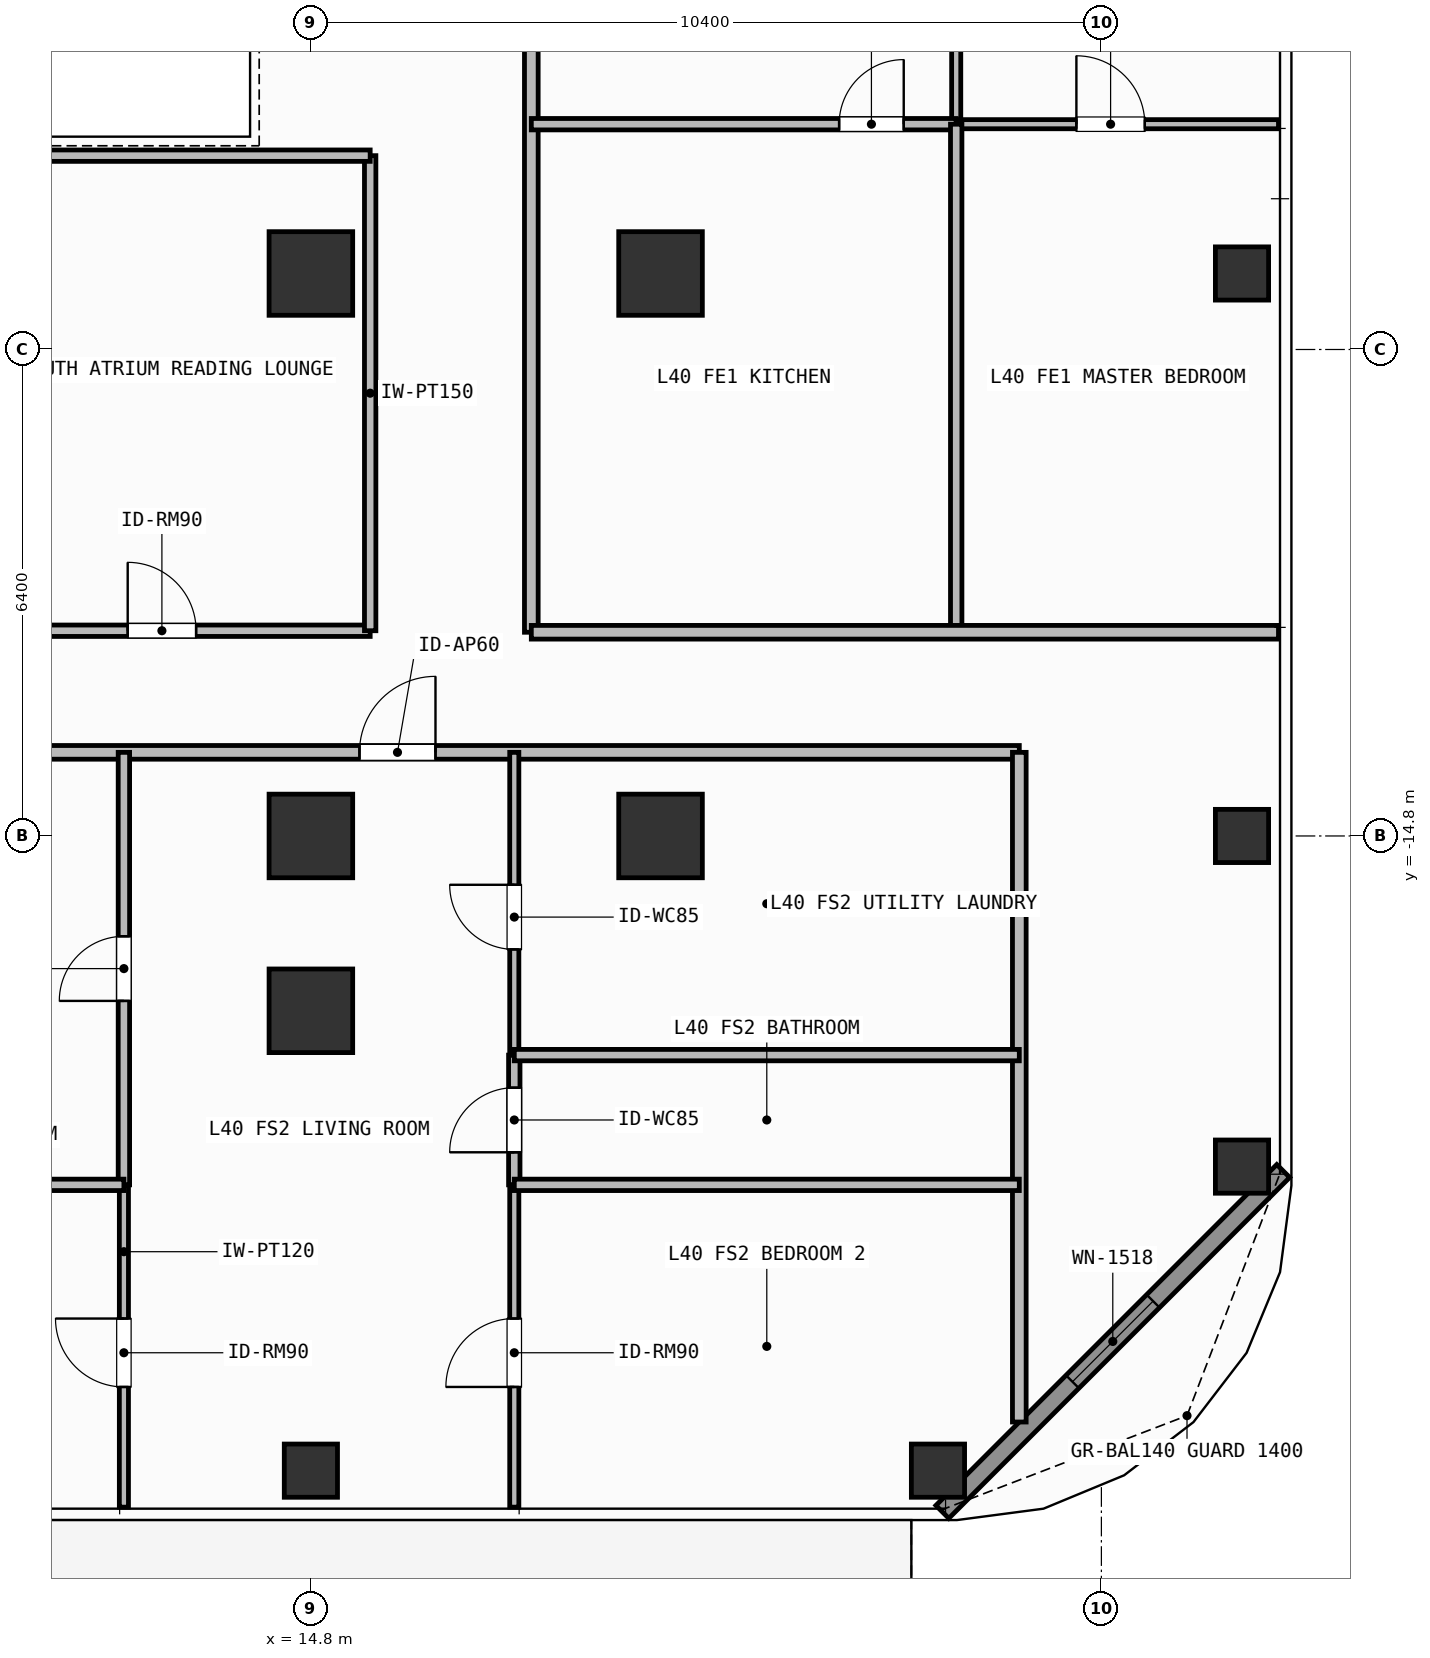
"""IFC4 building model, lengths in metres.
Left out: names, types, materials, properties, quantities, classifications, styles, units other than length and angle.
Written with IfcOpenShell. Run it as: python <this file> out.ifc"""

import sys

from ifc_helpers import new_model, si_unit, direction, frame, frame_2d, origin, origin_2d, place, context, subcontext, project, spatial, rectangle, hollow_rectangle, extrude, element, fill, save


model = new_model("IFC4")
c1 = context("Model", 3, precision=1e-05, world=origin(), true_north=direction((0.0, 1.0)))
c2 = subcontext(c1, "Body", "Model", "MODEL_VIEW")
j1 = project(units=[si_unit("LENGTHUNIT", "METRE"), si_unit("PLANEANGLEUNIT", "RADIAN")], contexts=[c1])
p1 = place(None, origin())
s1 = spatial("IfcSite", under=j1, at=p1, CompositionType="ELEMENT")
p2 = place(p1, origin())
s2 = spatial("IfcBuilding", under=s1, at=p2, CompositionType="ELEMENT")
p3 = place(p2, frame((0.0, 0.0, 164.1)))
s3 = spatial("IfcBuildingStorey", under=s2, at=p3, CompositionType="ELEMENT", Elevation=164.1)
for number, where, z_axis, x_axis in (
    (1, (14.8, -14.8, 0.0), (0.0, 0.0, 1.0), (1.0, 0.0, 0.0)),
    (2, (14.8, -7.4, 0.0), (0.0, 0.0, 1.0), (1.0, 0.0, 0.0)),
    (3, (19.4, -14.8, 0.0), (0.0, 0.0, 1.0), (1.0, 0.0, 0.0)),
    (4, (19.4, -7.4, 0.0), (0.0, 0.0, 1.0), (1.0, 0.0, 0.0)),
    (5, (14.8, -17.1, 0.0), (0.0, 0.0, 1.0), (1.0, 0.0, 0.0)),
):
    element("IfcColumn", number, at=place(p3, frame(where, z_axis=z_axis, x_axis=x_axis)), inside=s3, PredefinedType="COLUMN", context=c2, shape_type="SweptSolid", body=[
        extrude(rectangle(XDim=1.1, YDim=1.1, at=origin_2d()), origin(), (0.0, 0.0, 1.0), 3.9),
    ])
for number, where, z_axis, x_axis in (
    (6, (23.05, -23.15, 0.0), (0.0, 0.0, 1.0), (1.0, 0.0, 0.0)),
    (7, (27.05, -19.15, 0.0), (0.0, 0.0, 1.0), (1.0, 0.0, 0.0)),
    (8, (14.8, -23.15, 0.0), (0.0, 0.0, 1.0), (1.0, 0.0, 0.0)),
    (9, (27.05, -14.8, 0.0), (0.0, 0.0, 1.0), (1.0, 0.0, 0.0)),
    (10, (27.05, -7.4, 0.0), (0.0, 0.0, 1.0), (1.0, 0.0, 0.0)),
):
    element("IfcColumn", number, at=place(p3, frame(where, z_axis=z_axis, x_axis=x_axis)), inside=s3, PredefinedType="COLUMN", context=c2, shape_type="SweptSolid", body=[
        extrude(hollow_rectangle(XDim=0.7, YDim=0.7, WallThickness=0.032, at=origin_2d()), origin(), (0.0, 0.0, 1.0), 3.9),
    ])
p4 = place(p3, frame((27.592, -19.208, 0.0), z_axis=(0.0, 0.0, 1.0), x_axis=(-0.707087534163, -0.707126027686, 0.0)))
e11 = element("IfcWall", 11, at=p4, inside=s3, PredefinedType="SOLIDWALL", context=c2, shape_type="SweptSolid", body=[
    extrude(rectangle(XDim=6.342, YDim=0.24, at=frame_2d((3.171, 0.0))), origin(), (0.0, 0.0, 1.0), 3.62),
])
p5 = place(p4, frame((2.421, 0.0, 0.8)))
e12 = element("IfcOpeningElement", 12, at=p5, cuts=e11, PredefinedType="OPENING", context=c2, shape_type="SweptSolid", body=[
    extrude(rectangle(XDim=1.5, YDim=1.85, at=frame_2d((0.75, 0.925))), frame((0.0, 0.13, 0.0), z_axis=(0.0, -1.0, 0.0), x_axis=(1.0, 0.0, 0.0)), (0.0, 0.0, 1.0), 0.26),
])
p6 = place(p3, frame((10.1, -12.1, 0.0), z_axis=(0.0, 0.0, 1.0), x_axis=(1.0, 0.0, 0.0)))
e13 = element("IfcWall", 13, at=p6, inside=s3, PredefinedType="PARTITIONING", context=c2, shape_type="SweptSolid", body=[
    extrude(rectangle(XDim=5.48, YDim=0.15, at=frame_2d((2.74, 0.0))), origin(), (0.0, 0.0, 1.0), 3.62),
])
p7 = place(p6, frame((2.29, 0.0, 0.0)))
e14 = element("IfcOpeningElement", 14, at=p7, cuts=e13, PredefinedType="OPENING", context=c2, shape_type="SweptSolid", body=[
    extrude(rectangle(XDim=0.9, YDim=2.1, at=frame_2d((0.45, 1.05))), frame((0.0, 0.085, 0.0), z_axis=(0.0, -1.0, 0.0), x_axis=(1.0, 0.0, 0.0)), (0.0, 0.0, 1.0), 0.17),
])
p8 = place(p3, frame((6.326, -13.7, 0.0), z_axis=(0.0, 0.0, 1.0), x_axis=(1.0, 0.0, 0.0)))
e15 = element("IfcWall", 15, at=p8, inside=s3, PredefinedType="PARTITIONING", context=c2, shape_type="SweptSolid", body=[
    extrude(rectangle(XDim=17.794, YDim=0.18, at=frame_2d((8.897, 0.0))), origin(), (0.0, 0.0, 1.0), 3.62),
])
p9 = place(p8, frame((9.113, 0.0, 0.0)))
e16 = element("IfcOpeningElement", 16, at=p9, cuts=e15, PredefinedType="OPENING", context=c2, shape_type="SweptSolid", body=[
    extrude(rectangle(XDim=1.0, YDim=2.2, at=frame_2d((0.5, 1.1))), frame((0.0, 0.1, 0.0), z_axis=(0.0, -1.0, 0.0), x_axis=(1.0, 0.0, 0.0)), (0.0, 0.0, 1.0), 0.2),
])
p10 = place(p3, frame((12.34, -19.39, 0.0), z_axis=(0.0, 0.0, 1.0), x_axis=(0.0, 1.0, 0.0)))
e17 = element("IfcWall", 17, at=p10, inside=s3, PredefinedType="PARTITIONING", context=c2, shape_type="SweptSolid", body=[
    extrude(rectangle(XDim=5.69, YDim=0.15, at=frame_2d((2.845, 0.0))), origin(), (0.0, 0.0, 1.0), 3.62),
])
p11 = place(p10, frame((2.42, 0.0, 0.0)))
e18 = element("IfcOpeningElement", 18, at=p11, cuts=e17, PredefinedType="OPENING", context=c2, shape_type="SweptSolid", body=[
    extrude(rectangle(XDim=0.85, YDim=2.1, at=frame_2d((0.425, 1.05))), frame((0.0, 0.085, 0.0), z_axis=(0.0, -1.0, 0.0), x_axis=(1.0, 0.0, 0.0)), (0.0, 0.0, 1.0), 0.17),
])
p12 = place(p3, frame((12.34, -23.63, 0.0), z_axis=(0.0, 0.0, 1.0), x_axis=(0.0, 1.0, 0.0)))
e19 = element("IfcWall", 19, at=p12, inside=s3, PredefinedType="PARTITIONING", context=c2, shape_type="SweptSolid", body=[
    extrude(rectangle(XDim=4.24, YDim=0.12, at=frame_2d((2.12, 0.0))), origin(), (0.0, 0.0, 1.0), 3.62),
])
p13 = place(p12, frame((1.581, 0.0, 0.0)))
e20 = element("IfcOpeningElement", 20, at=p13, cuts=e19, PredefinedType="OPENING", context=c2, shape_type="SweptSolid", body=[
    extrude(rectangle(XDim=0.9, YDim=2.1, at=frame_2d((0.45, 1.05))), frame((0.0, 0.07, 0.0), z_axis=(0.0, -1.0, 0.0), x_axis=(1.0, 0.0, 0.0)), (0.0, 0.0, 1.0), 0.14),
])
p14 = place(p3, frame((17.476, -19.39, 0.0), z_axis=(0.0, 0.0, 1.0), x_axis=(0.0, 1.0, 0.0)))
e21 = element("IfcWall", 21, at=p14, inside=s3, PredefinedType="PARTITIONING", context=c2, shape_type="SweptSolid", body=[
    extrude(rectangle(XDim=1.707, YDim=0.15, at=frame_2d((0.854, 0.0))), origin(), (0.0, 0.0, 1.0), 3.62),
])
p15 = place(p14, frame((0.428, 0.0, 0.0)))
e22 = element("IfcOpeningElement", 22, at=p15, cuts=e21, PredefinedType="OPENING", context=c2, shape_type="SweptSolid", body=[
    extrude(rectangle(XDim=0.85, YDim=2.1, at=frame_2d((0.425, 1.05))), frame((0.0, 0.085, 0.0), z_axis=(0.0, -1.0, 0.0), x_axis=(1.0, 0.0, 0.0)), (0.0, 0.0, 1.0), 0.17),
])
p16 = place(p3, frame((17.476, -17.683, 0.0), z_axis=(0.0, 0.0, 1.0), x_axis=(0.0, 1.0, 0.0)))
e23 = element("IfcWall", 23, at=p16, inside=s3, PredefinedType="PARTITIONING", context=c2, shape_type="SweptSolid", body=[
    extrude(rectangle(XDim=3.983, YDim=0.12, at=frame_2d((1.992, 0.0))), origin(), (0.0, 0.0, 1.0), 3.62),
])
p17 = place(p16, frame((1.391, 0.0, 0.0)))
e24 = element("IfcOpeningElement", 24, at=p17, cuts=e23, PredefinedType="OPENING", context=c2, shape_type="SweptSolid", body=[
    extrude(rectangle(XDim=0.85, YDim=2.1, at=frame_2d((0.425, 1.05))), frame((0.0, 0.07, 0.0), z_axis=(0.0, -1.0, 0.0), x_axis=(1.0, 0.0, 0.0)), (0.0, 0.0, 1.0), 0.14),
])
p18 = place(p3, frame((17.476, -23.63, 0.0), z_axis=(0.0, 0.0, 1.0), x_axis=(0.0, 1.0, 0.0)))
e25 = element("IfcWall", 25, at=p18, inside=s3, PredefinedType="PARTITIONING", context=c2, shape_type="SweptSolid", body=[
    extrude(rectangle(XDim=4.24, YDim=0.12, at=frame_2d((2.12, 0.0))), origin(), (0.0, 0.0, 1.0), 3.62),
])
p19 = place(p18, frame((1.581, 0.0, 0.0)))
e26 = element("IfcOpeningElement", 26, at=p19, cuts=e25, PredefinedType="OPENING", context=c2, shape_type="SweptSolid", body=[
    extrude(rectangle(XDim=0.9, YDim=2.1, at=frame_2d((0.45, 1.05))), frame((0.0, 0.07, 0.0), z_axis=(0.0, -1.0, 0.0), x_axis=(1.0, 0.0, 0.0)), (0.0, 0.0, 1.0), 0.14),
])
p20 = place(p3, frame((17.7, -12.12, 0.0), z_axis=(0.0, 0.0, 1.0), x_axis=(0.0, 1.0, 0.0)))
e27 = element("IfcWall", 27, at=p20, inside=s3, PredefinedType="PARTITIONING", context=c2, shape_type="SweptSolid", body=[
    extrude(rectangle(XDim=24.24, YDim=0.18, at=frame_2d((12.12, 0.0))), origin(), (0.0, 0.0, 1.0), 3.62),
])
p21 = place(p20, frame((11.62, 0.0, 0.0)))
e28 = element("IfcOpeningElement", 28, at=p21, cuts=e27, PredefinedType="OPENING", context=c2, shape_type="SweptSolid", body=[
    extrude(rectangle(XDim=1.0, YDim=2.2, at=frame_2d((0.5, 1.1))), frame((0.0, 0.1, 0.0), z_axis=(0.0, -1.0, 0.0), x_axis=(1.0, 0.0, 0.0)), (0.0, 0.0, 1.0), 0.2),
])
p22 = place(p3, frame((23.29, -5.436, 0.0), z_axis=(0.0, 0.0, 1.0), x_axis=(0.0, 1.0, 0.0)))
e29 = element("IfcWall", 29, at=p22, inside=s3, PredefinedType="PARTITIONING", context=c2, shape_type="SweptSolid", body=[
    extrude(rectangle(XDim=10.872, YDim=0.12, at=frame_2d((5.436, 0.0))), origin(), (0.0, 0.0, 1.0), 3.62),
])
p23 = place(p22, frame((4.986, 0.0, 0.0)))
e30 = element("IfcOpeningElement", 30, at=p23, cuts=e29, PredefinedType="OPENING", context=c2, shape_type="SweptSolid", body=[
    extrude(rectangle(XDim=0.9, YDim=2.1, at=frame_2d((0.45, 1.05))), frame((0.0, 0.07, 0.0), z_axis=(0.0, -1.0, 0.0), x_axis=(1.0, 0.0, 0.0)), (0.0, 0.0, 1.0), 0.14),
])
p24 = place(p3, frame((17.7, -5.436, 0.0), z_axis=(0.0, 0.0, 1.0), x_axis=(1.0, 0.0, 0.0)))
e31 = element("IfcWall", 31, at=p24, inside=s3, PredefinedType="PARTITIONING", context=c2, shape_type="SweptSolid", body=[
    extrude(rectangle(XDim=5.59, YDim=0.15, at=frame_2d((2.795, 0.0))), origin(), (0.0, 0.0, 1.0), 3.62),
])
p25 = place(p24, frame((4.05, 0.0, 0.0)))
e32 = element("IfcOpeningElement", 32, at=p25, cuts=e31, PredefinedType="OPENING", context=c2, shape_type="SweptSolid", body=[
    extrude(rectangle(XDim=0.85, YDim=2.1, at=frame_2d((0.425, 1.05))), frame((0.0, 0.085, 0.0), z_axis=(0.0, -1.0, 0.0), x_axis=(1.0, 0.0, 0.0)), (0.0, 0.0, 1.0), 0.17),
])
p26 = place(p3, frame((23.29, -5.436, 0.0), z_axis=(0.0, 0.0, 1.0), x_axis=(1.0, 0.0, 0.0)))
e33 = element("IfcWall", 33, at=p26, inside=s3, PredefinedType="PARTITIONING", context=c2, shape_type="SweptSolid", body=[
    extrude(rectangle(XDim=4.24, YDim=0.12, at=frame_2d((2.12, 0.0))), origin(), (0.0, 0.0, 1.0), 3.62),
])
p27 = place(p26, frame((1.581, 0.0, 0.0)))
e34 = element("IfcOpeningElement", 34, at=p27, cuts=e33, PredefinedType="OPENING", context=c2, shape_type="SweptSolid", body=[
    extrude(rectangle(XDim=0.9, YDim=2.1, at=frame_2d((0.45, 1.05))), frame((0.0, 0.07, 0.0), z_axis=(0.0, -1.0, 0.0), x_axis=(1.0, 0.0, 0.0)), (0.0, 0.0, 1.0), 0.14),
])
p28 = place(p3, frame((15.58, -12.1, 0.0), z_axis=(0.0, 0.0, 1.0), x_axis=(0.0, 1.0, 0.0)))
e35 = element("IfcWall", 35, at=p28, inside=s3, PredefinedType="PARTITIONING", context=c2, shape_type="SweptSolid", body=[
    extrude(rectangle(XDim=6.25, YDim=0.15, at=frame_2d((3.125, 0.0))), origin(), (0.0, 0.0, 1.0), 3.62),
])
p29 = place(p3, frame((8.96, -5.85, 0.0), z_axis=(0.0, 0.0, 1.0), x_axis=(1.0, 0.0, 0.0)))
e36 = element("IfcWall", 36, at=p29, inside=s3, PredefinedType="PARTITIONING", context=c2, shape_type="SweptSolid", body=[
    extrude(rectangle(XDim=6.62, YDim=0.15, at=frame_2d((3.31, 0.0))), origin(), (0.0, 0.0, 1.0), 3.62),
])
p30 = place(p3, frame((24.12, -22.51, 0.0), z_axis=(0.0, 0.0, 1.0), x_axis=(0.0, 1.0, 0.0)))
e37 = element("IfcWall", 37, at=p30, inside=s3, PredefinedType="PARTITIONING", context=c2, shape_type="SweptSolid", body=[
    extrude(rectangle(XDim=8.81, YDim=0.18, at=frame_2d((4.405, 0.0))), origin(), (0.0, 0.0, 1.0), 3.62),
])
p31 = place(p3, frame((6.326, -19.39, 0.0), z_axis=(0.0, 0.0, 1.0), x_axis=(1.0, 0.0, 0.0)))
e38 = element("IfcWall", 38, at=p31, inside=s3, PredefinedType="PARTITIONING", context=c2, shape_type="SweptSolid", body=[
    extrude(rectangle(XDim=6.014, YDim=0.15, at=frame_2d((3.007, 0.0))), origin(), (0.0, 0.0, 1.0), 3.62),
])
for number, where, z_axis, x_axis in (
    (39, (17.476, -17.683, 0.0), (0.0, 0.0, 1.0), (1.0, 0.0, 0.0)),
    (40, (17.476, -19.39, 0.0), (0.0, 0.0, 1.0), (1.0, 0.0, 0.0)),
):
    element("IfcWall", number, at=place(p3, frame(where, z_axis=z_axis, x_axis=x_axis)), inside=s3, PredefinedType="PARTITIONING", context=c2, shape_type="SweptSolid", body=[
        extrude(rectangle(XDim=6.644, YDim=0.15, at=frame_2d((3.322, 0.0))), origin(), (0.0, 0.0, 1.0), 3.62),
    ])
p32 = place(p3, frame((23.29, -12.12, 0.0), z_axis=(0.0, 0.0, 1.0), x_axis=(0.0, 1.0, 0.0)))
e41 = element("IfcWall", 41, at=p32, inside=s3, PredefinedType="PARTITIONING", context=c2, shape_type="SweptSolid", body=[
    extrude(rectangle(XDim=6.684, YDim=0.15, at=frame_2d((3.342, 0.0))), origin(), (0.0, 0.0, 1.0), 3.62),
])
p33 = place(p3, frame((17.7, -12.12, 0.0), z_axis=(0.0, 0.0, 1.0), x_axis=(1.0, 0.0, 0.0)))
e42 = element("IfcWall", 42, at=p33, inside=s3, PredefinedType="PARTITIONING", context=c2, shape_type="SweptSolid", body=[
    extrude(rectangle(XDim=9.83, YDim=0.18, at=frame_2d((4.915, 0.0))), origin(), (0.0, 0.0, 1.0), 3.62),
])
p34 = place(p5, origin())
e43 = element("IfcWindow", 43, at=p34, inside=s3, PartitioningType="SINGLE_PANEL", PredefinedType="WINDOW", context=c2, shape_type="SweptSolid", body=[
    extrude(rectangle(XDim=1.5, YDim=1.85, at=frame_2d((0.75, 0.925))), frame((0.0, 0.03, 0.0), z_axis=(0.0, -1.0, 0.0), x_axis=(1.0, 0.0, 0.0)), (0.0, 0.0, 1.0), 0.06),
])
fill(e12, e43)
p35 = place(p7, origin())
e44 = element("IfcDoor", 44, at=p35, inside=s3, OperationType="SINGLE_SWING_LEFT", PredefinedType="DOOR", context=c2, shape_type="SweptSolid", body=[
    extrude(rectangle(XDim=0.9, YDim=2.1, at=frame_2d((0.45, 1.05))), frame((0.0, 0.025, 0.0), z_axis=(0.0, -1.0, 0.0), x_axis=(1.0, 0.0, 0.0)), (0.0, 0.0, 1.0), 0.05),
])
fill(e14, e44)
p36 = place(p9, origin())
e45 = element("IfcDoor", 45, at=p36, inside=s3, OperationType="SINGLE_SWING_RIGHT", PredefinedType="DOOR", context=c2, shape_type="SweptSolid", body=[
    extrude(rectangle(XDim=1.0, YDim=2.2, at=frame_2d((0.5, 1.1))), frame((0.0, 0.025, 0.0), z_axis=(0.0, -1.0, 0.0), x_axis=(1.0, 0.0, 0.0)), (0.0, 0.0, 1.0), 0.05),
])
fill(e16, e45)
p37 = place(p11, origin())
e46 = element("IfcDoor", 46, at=p37, inside=s3, OperationType="SINGLE_SWING_LEFT", PredefinedType="DOOR", context=c2, shape_type="SweptSolid", body=[
    extrude(rectangle(XDim=0.85, YDim=2.1, at=frame_2d((0.425, 1.05))), frame((0.0, 0.025, 0.0), z_axis=(0.0, -1.0, 0.0), x_axis=(1.0, 0.0, 0.0)), (0.0, 0.0, 1.0), 0.05),
])
fill(e18, e46)
p38 = place(p13, origin())
e47 = element("IfcDoor", 47, at=p38, inside=s3, OperationType="SINGLE_SWING_RIGHT", PredefinedType="DOOR", context=c2, shape_type="SweptSolid", body=[
    extrude(rectangle(XDim=0.9, YDim=2.1, at=frame_2d((0.45, 1.05))), frame((0.0, 0.025, 0.0), z_axis=(0.0, -1.0, 0.0), x_axis=(1.0, 0.0, 0.0)), (0.0, 0.0, 1.0), 0.05),
])
fill(e20, e47)
p39 = place(p15, origin())
e48 = element("IfcDoor", 48, at=p39, inside=s3, OperationType="SINGLE_SWING_LEFT", PredefinedType="DOOR", context=c2, shape_type="SweptSolid", body=[
    extrude(rectangle(XDim=0.85, YDim=2.1, at=frame_2d((0.425, 1.05))), frame((0.0, 0.025, 0.0), z_axis=(0.0, -1.0, 0.0), x_axis=(1.0, 0.0, 0.0)), (0.0, 0.0, 1.0), 0.05),
])
fill(e22, e48)
p40 = place(p17, origin())
e49 = element("IfcDoor", 49, at=p40, inside=s3, OperationType="SINGLE_SWING_RIGHT", PredefinedType="DOOR", context=c2, shape_type="SweptSolid", body=[
    extrude(rectangle(XDim=0.85, YDim=2.1, at=frame_2d((0.425, 1.05))), frame((0.0, 0.025, 0.0), z_axis=(0.0, -1.0, 0.0), x_axis=(1.0, 0.0, 0.0)), (0.0, 0.0, 1.0), 0.05),
])
fill(e24, e49)
p41 = place(p19, origin())
e50 = element("IfcDoor", 50, at=p41, inside=s3, OperationType="SINGLE_SWING_LEFT", PredefinedType="DOOR", context=c2, shape_type="SweptSolid", body=[
    extrude(rectangle(XDim=0.9, YDim=2.1, at=frame_2d((0.45, 1.05))), frame((0.0, 0.025, 0.0), z_axis=(0.0, -1.0, 0.0), x_axis=(1.0, 0.0, 0.0)), (0.0, 0.0, 1.0), 0.05),
])
fill(e26, e50)
p42 = place(p25, origin())
e51 = element("IfcDoor", 51, at=p42, inside=s3, OperationType="SINGLE_SWING_RIGHT", PredefinedType="DOOR", context=c2, shape_type="SweptSolid", body=[
    extrude(rectangle(XDim=0.85, YDim=2.1, at=frame_2d((0.425, 1.05))), frame((0.0, 0.025, 0.0), z_axis=(0.0, -1.0, 0.0), x_axis=(1.0, 0.0, 0.0)), (0.0, 0.0, 1.0), 0.05),
])
fill(e32, e51)
p43 = place(p27, origin())
e52 = element("IfcDoor", 52, at=p43, inside=s3, OperationType="SINGLE_SWING_LEFT", PredefinedType="DOOR", context=c2, shape_type="SweptSolid", body=[
    extrude(rectangle(XDim=0.9, YDim=2.1, at=frame_2d((0.45, 1.05))), frame((0.0, 0.025, 0.0), z_axis=(0.0, -1.0, 0.0), x_axis=(1.0, 0.0, 0.0)), (0.0, 0.0, 1.0), 0.05),
])
fill(e34, e52)
save(model, sys.argv[1])
